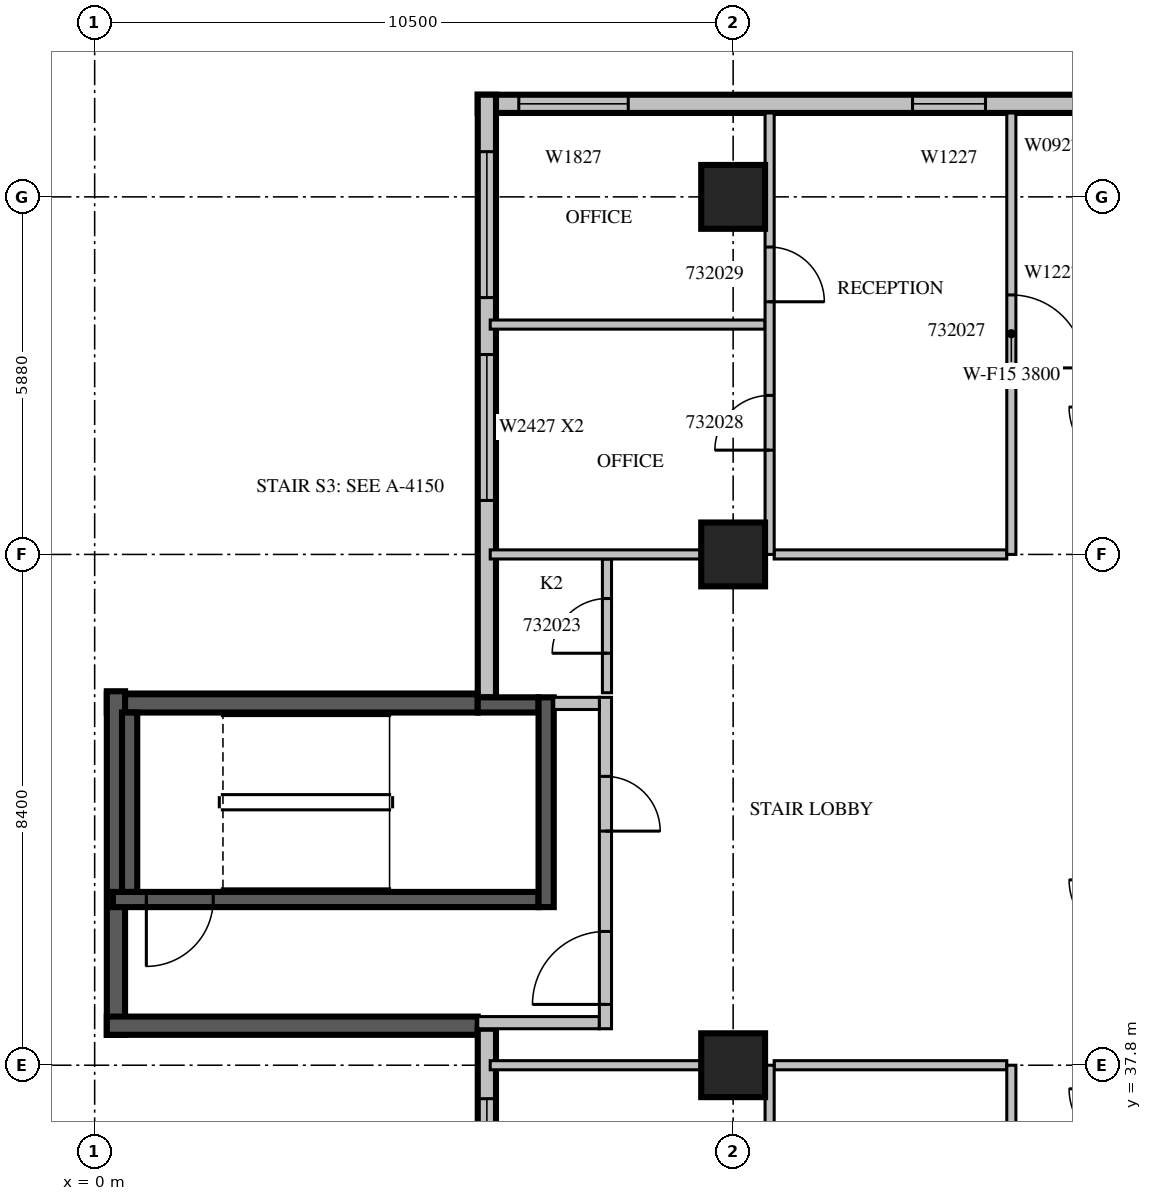
"""IFC4 building model, lengths in metres.
Left out: names, types, materials, properties, quantities, classifications, styles, units other than length and angle.
Written with IfcOpenShell. Run it as: python <this file> out.ifc"""

import sys

from ifc_helpers import new_model, si_unit, direction, frame, frame_2d, origin, origin_2d, place, context, subcontext, project, spatial, rectangle, extrude, source, transform, mapped, element, fill, save


model = new_model("IFC4")
c1 = context("Model", 3, precision=1e-05, world=origin(), true_north=direction((0.0, 1.0)))
c2 = subcontext(c1, "Body", "Model", "MODEL_VIEW")
j1 = project(units=[si_unit("LENGTHUNIT", "METRE"), si_unit("PLANEANGLEUNIT", "RADIAN")], contexts=[c1])
p1 = place(None, origin())
s1 = spatial("IfcSite", under=j1, at=p1, CompositionType="ELEMENT")
p2 = place(p1, origin())
s2 = spatial("IfcBuilding", under=s1, at=p2, CompositionType="ELEMENT")
p3 = place(p2, frame((0.0, 0.0, 145.5)))
s3 = spatial("IfcBuildingStorey", under=s2, at=p3, CompositionType="ELEMENT", Elevation=145.5)
m1 = source(origin(), c2, "Body", "SweptSolid", [
    extrude(rectangle(XDim=1.05, YDim=1.05, at=origin_2d()), origin(), (0.0, 0.0, 1.0), 4.2),
])
for number, where, z_axis, x_axis in (
    (1, (10.5, 37.8, 0.0), (0.0, 0.0, 1.0), (1.0, 0.0, 0.0)),
    (2, (10.5, 46.2, 0.0), (0.0, 0.0, 1.0), (1.0, 0.0, 0.0)),
    (3, (10.5, 52.08, 0.0), (0.0, 0.0, 1.0), (1.0, 0.0, 0.0)),
):
    element("IfcColumn", number, at=place(p3, frame(where, z_axis=z_axis, x_axis=x_axis)), inside=s3, PredefinedType="COLUMN", context=c2, shape_type="MappedRepresentation", body=[
        mapped(m1, transform((0.0, 0.0, 0.0), scale=1.0)),
    ])
m2 = source(origin(), c2, "Body", "SweptSolid", [
    extrude(rectangle(XDim=10.5, YDim=0.3, at=frame_2d((5.25, 0.0))), origin(), (0.0, 0.0, 1.0), 3.8),
])
p4 = place(p3, frame((16.8, 53.61, 0.0), z_axis=(0.0, 0.0, 1.0), x_axis=(-1.0, 0.0, 0.0)))
e4 = element("IfcWall", 4, at=p4, inside=s3, PredefinedType="STANDARD", context=c2, shape_type="MappedRepresentation", body=[
    mapped(m2, transform((0.0, 0.0, 0.0), scale=1.0)),
])
m3 = source(origin(), c2, "Body", "SweptSolid", [
    extrude(rectangle(XDim=1.2, YDim=2.7, at=frame_2d((0.6, 1.35))), frame((0.0, 0.16, 0.0), z_axis=(0.0, -1.0, 0.0), x_axis=(1.0, 0.0, 0.0)), (0.0, 0.0, 1.0), 0.32),
])
p5 = place(p4, frame((2.15, 0.0, 0.6)))
e5 = element("IfcOpeningElement", 5, at=p5, cuts=e4, PredefinedType="OPENING", context=c2, shape_type="MappedRepresentation", body=[
    mapped(m3, transform((0.0, 0.0, 0.0), scale=1.0)),
])
m4 = source(origin(), c2, "Body", "SweptSolid", [
    extrude(rectangle(XDim=1.8, YDim=2.7, at=frame_2d((0.9, 1.35))), frame((0.0, 0.16, 0.0), z_axis=(0.0, -1.0, 0.0), x_axis=(1.0, 0.0, 0.0)), (0.0, 0.0, 1.0), 0.32),
])
p6 = place(p4, frame((8.025, 0.0, 0.6)))
e6 = element("IfcOpeningElement", 6, at=p6, cuts=e4, PredefinedType="OPENING", context=c2, shape_type="MappedRepresentation", body=[
    mapped(m4, transform((0.0, 0.0, 0.0), scale=1.0)),
])
m5 = source(origin(), c2, "Body", "SweptSolid", [
    extrude(rectangle(XDim=9.91, YDim=0.3, at=frame_2d((4.955, 0.0))), origin(), (0.0, 0.0, 1.0), 3.8),
])
p7 = place(p3, frame((6.45, 53.76, 0.0), z_axis=(0.0, 0.0, 1.0), x_axis=(0.0, -1.0, 0.0)))
e7 = element("IfcWall", 7, at=p7, inside=s3, PredefinedType="STANDARD", context=c2, shape_type="MappedRepresentation", body=[
    mapped(m5, transform((0.0, 0.0, 0.0), scale=1.0)),
])
m6 = source(origin(), c2, "Body", "SweptSolid", [
    extrude(rectangle(XDim=2.4, YDim=2.7, at=frame_2d((1.2, 1.35))), frame((0.0, 0.16, 0.0), z_axis=(0.0, -1.0, 0.0), x_axis=(1.0, 0.0, 0.0)), (0.0, 0.0, 1.0), 0.32),
])
p8 = place(p7, frame((4.272, 0.0, 0.6)))
e8 = element("IfcOpeningElement", 8, at=p8, cuts=e7, PredefinedType="OPENING", context=c2, shape_type="MappedRepresentation", body=[
    mapped(m6, transform((0.0, 0.0, 0.0), scale=1.0)),
])
p9 = place(p7, frame((0.936, 0.0, 0.6)))
e9 = element("IfcOpeningElement", 9, at=p9, cuts=e7, PredefinedType="OPENING", context=c2, shape_type="MappedRepresentation", body=[
    mapped(m6, transform((0.0, 0.0, 0.0), scale=1.0)),
])
m7 = source(origin(), c2, "Body", "SweptSolid", [
    extrude(rectangle(XDim=6.1, YDim=0.3, at=frame_2d((3.05, 0.0))), origin(), (0.0, 0.0, 1.0), 3.8),
])
p10 = place(p3, frame((6.3, 43.75, 0.0), z_axis=(0.0, 0.0, 1.0), x_axis=(-1.0, 0.0, 0.0)))
e10 = element("IfcWall", 10, at=p10, inside=s3, PredefinedType="SOLIDWALL", context=c2, shape_type="MappedRepresentation", body=[
    mapped(m7, transform((0.0, 0.0, 0.0), scale=1.0)),
])
m8 = source(origin(), c2, "Body", "SweptSolid", [
    extrude(rectangle(XDim=5.65, YDim=0.3, at=frame_2d((2.825, 0.0))), origin(), (0.0, 0.0, 1.0), 3.8),
])
p11 = place(p3, frame((0.35, 43.95, 0.0), z_axis=(0.0, 0.0, 1.0), x_axis=(0.0, -1.0, 0.0)))
e11 = element("IfcWall", 11, at=p11, inside=s3, PredefinedType="SOLIDWALL", context=c2, shape_type="MappedRepresentation", body=[
    mapped(m8, transform((0.0, 0.0, 0.0), scale=1.0)),
])
p12 = place(p3, frame((0.2, 38.45, 0.0), z_axis=(0.0, 0.0, 1.0), x_axis=(1.0, 0.0, 0.0)))
e12 = element("IfcWall", 12, at=p12, inside=s3, PredefinedType="SOLIDWALL", context=c2, shape_type="MappedRepresentation", body=[
    mapped(m7, transform((0.0, 0.0, 0.0), scale=1.0)),
])
m9 = source(origin(), c2, "Body", "SweptSolid", [
    extrude(rectangle(XDim=16.4, YDim=0.3, at=frame_2d((8.2, 0.0))), origin(), (0.0, 0.0, 1.0), 3.3),
])
p13 = place(p3, frame((6.45, 38.4, 0.0), z_axis=(0.0, 0.0, 1.0), x_axis=(0.0, -1.0, 0.0)))
e13 = element("IfcWall", 13, at=p13, inside=s3, PredefinedType="STANDARD", context=c2, shape_type="MappedRepresentation", body=[
    mapped(m9, transform((0.0, 0.0, 0.0), scale=1.0)),
])
p14 = place(p13, frame((1.15, 0.0, 0.6)))
e14 = element("IfcOpeningElement", 14, at=p14, cuts=e13, PredefinedType="OPENING", context=c2, shape_type="MappedRepresentation", body=[
    mapped(m4, transform((0.0, 0.0, 0.0), scale=1.0)),
])
p15 = place(p13, frame((5.162, 0.0, 0.6)))
e15 = element("IfcOpeningElement", 15, at=p15, cuts=e13, PredefinedType="OPENING", context=c2, shape_type="MappedRepresentation", body=[
    mapped(m4, transform((0.0, 0.0, 0.0), scale=1.0)),
])
p16 = place(p13, frame((9.438, 0.0, 0.6)))
e16 = element("IfcOpeningElement", 16, at=p16, cuts=e13, PredefinedType="OPENING", context=c2, shape_type="MappedRepresentation", body=[
    mapped(m4, transform((0.0, 0.0, 0.0), scale=1.0)),
])
p17 = place(p13, frame((12.912, 0.0, 0.6)))
e17 = element("IfcOpeningElement", 17, at=p17, cuts=e13, PredefinedType="OPENING", context=c2, shape_type="MappedRepresentation", body=[
    mapped(m3, transform((0.0, 0.0, 0.0), scale=1.0)),
])
m10 = source(origin(), c2, "Body", "SweptSolid", [
    extrude(rectangle(XDim=7.0, YDim=0.25, at=frame_2d((3.5, 0.0))), origin(), (0.0, 0.0, 1.0), 3.8),
])
p18 = place(p3, frame((0.3, 40.525, 0.0), z_axis=(0.0, 0.0, 1.0), x_axis=(1.0, 0.0, 0.0)))
e18 = element("IfcWall", 18, at=p18, inside=s3, PredefinedType="SOLIDWALL", context=c2, shape_type="MappedRepresentation", body=[
    mapped(m10, transform((0.0, 0.0, 0.0), scale=1.0)),
])
m11 = source(origin(), c2, "Body", "SweptSolid", [
    extrude(rectangle(XDim=1.1, YDim=2.1, at=frame_2d((0.55, 1.05))), frame((0.0, 0.135, 0.0), z_axis=(0.0, -1.0, 0.0), x_axis=(1.0, 0.0, 0.0)), (0.0, 0.0, 1.0), 0.27),
])
p19 = place(p18, frame((0.55, 0.0, 0.0)))
e19 = element("IfcOpeningElement", 19, at=p19, cuts=e18, PredefinedType="OPENING", context=c2, shape_type="MappedRepresentation", body=[
    mapped(m11, transform((0.0, 0.0, 0.0), scale=1.0)),
])
m12 = source(origin(), c2, "Body", "SweptSolid", [
    extrude(rectangle(XDim=1.0, YDim=0.25, at=frame_2d((0.5, 0.0))), origin(), (0.0, 0.0, 1.0), 3.8),
])
p20 = place(p3, frame((6.3, 43.725, 0.0), z_axis=(0.0, 0.0, 1.0), x_axis=(1.0, 0.0, 0.0)))
e20 = element("IfcWall", 20, at=p20, inside=s3, PredefinedType="SOLIDWALL", context=c2, shape_type="MappedRepresentation", body=[
    mapped(m12, transform((0.0, 0.0, 0.0), scale=1.0)),
])
m13 = source(origin(), c2, "Body", "SweptSolid", [
    extrude(rectangle(XDim=3.45, YDim=0.25, at=frame_2d((1.725, 0.0))), origin(), (0.0, 0.0, 1.0), 3.8),
])
p21 = place(p3, frame((7.425, 40.4, 0.0), z_axis=(0.0, 0.0, 1.0), x_axis=(0.0, 1.0, 0.0)))
e21 = element("IfcWall", 21, at=p21, inside=s3, PredefinedType="SOLIDWALL", context=c2, shape_type="MappedRepresentation", body=[
    mapped(m13, transform((0.0, 0.0, 0.0), scale=1.0)),
])
m14 = source(origin(), c2, "Body", "SweptSolid", [
    extrude(rectangle(XDim=2.95, YDim=0.25, at=frame_2d((1.475, 0.0))), origin(), (0.0, 0.0, 1.0), 3.8),
])
p22 = place(p3, frame((0.575, 40.65, 0.0), z_axis=(0.0, 0.0, 1.0), x_axis=(0.0, 1.0, 0.0)))
e22 = element("IfcWall", 22, at=p22, inside=s3, PredefinedType="SOLIDWALL", context=c2, shape_type="MappedRepresentation", body=[
    mapped(m14, transform((0.0, 0.0, 0.0), scale=1.0)),
])
m15 = source(origin(), c2, "Body", "SweptSolid", [
    extrude(rectangle(XDim=2.0, YDim=0.2, at=frame_2d((1.0, 0.0))), origin(), (0.0, 0.0, 1.0), 3.8),
])
p23 = place(p3, frame((6.3, 38.5, 0.0), z_axis=(0.0, 0.0, 1.0), x_axis=(1.0, 0.0, 0.0)))
e23 = element("IfcWall", 23, at=p23, inside=s3, PredefinedType="PARTITIONING", context=c2, shape_type="MappedRepresentation", body=[
    mapped(m15, transform((0.0, 0.0, 0.0), scale=1.0)),
])
m16 = source(origin(), c2, "Body", "SweptSolid", [
    extrude(rectangle(XDim=5.45, YDim=0.2, at=frame_2d((2.725, 0.0))), origin(), (0.0, 0.0, 1.0), 3.8),
])
p24 = place(p3, frame((8.4, 38.4, 0.0), z_axis=(0.0, 0.0, 1.0), x_axis=(0.0, 1.0, 0.0)))
e24 = element("IfcWall", 24, at=p24, inside=s3, PredefinedType="PARTITIONING", context=c2, shape_type="MappedRepresentation", body=[
    mapped(m16, transform((0.0, 0.0, 0.0), scale=1.0)),
])
m17 = source(origin(), c2, "Body", "SweptSolid", [
    extrude(rectangle(XDim=1.2, YDim=2.1, at=frame_2d((0.6, 1.05))), frame((0.0, 0.11, 0.0), z_axis=(0.0, -1.0, 0.0), x_axis=(1.0, 0.0, 0.0)), (0.0, 0.0, 1.0), 0.22),
])
p25 = place(p24, frame((0.4, 0.0, 0.0)))
e25 = element("IfcOpeningElement", 25, at=p25, cuts=e24, PredefinedType="OPENING", context=c2, shape_type="MappedRepresentation", body=[
    mapped(m17, transform((0.0, 0.0, 0.0), scale=1.0)),
])
m18 = source(origin(), c2, "Body", "SweptSolid", [
    extrude(rectangle(XDim=0.9, YDim=2.1, at=frame_2d((0.45, 1.05))), frame((0.0, 0.11, 0.0), z_axis=(0.0, -1.0, 0.0), x_axis=(1.0, 0.0, 0.0)), (0.0, 0.0, 1.0), 0.22),
])
p26 = place(p24, frame((3.25, 0.0, 0.0)))
e26 = element("IfcOpeningElement", 26, at=p26, cuts=e24, PredefinedType="OPENING", context=c2, shape_type="MappedRepresentation", body=[
    mapped(m18, transform((0.0, 0.0, 0.0), scale=1.0)),
])
m19 = source(origin(), c2, "Body", "SweptSolid", [
    extrude(rectangle(XDim=0.75, YDim=0.2, at=frame_2d((0.375, 0.0))), origin(), (0.0, 0.0, 1.0), 3.8),
])
p27 = place(p3, frame((7.55, 43.75, 0.0), z_axis=(0.0, 0.0, 1.0), x_axis=(1.0, 0.0, 0.0)))
e27 = element("IfcWall", 27, at=p27, inside=s3, PredefinedType="PARTITIONING", context=c2, shape_type="MappedRepresentation", body=[
    mapped(m19, transform((0.0, 0.0, 0.0), scale=1.0)),
])
m20 = source(origin(), c2, "Body", "SweptSolid", [
    extrude(rectangle(XDim=2.2, YDim=0.15, at=frame_2d((1.1, 0.0))), origin(), (0.0, 0.0, 1.0), 3.8),
])
p28 = place(p3, frame((8.425, 43.925, 0.0), z_axis=(0.0, 0.0, 1.0), x_axis=(0.0, 1.0, 0.0)))
e28 = element("IfcWall", 28, at=p28, inside=s3, PredefinedType="PARTITIONING", context=c2, shape_type="MappedRepresentation", body=[
    mapped(m20, transform((0.0, 0.0, 0.0), scale=1.0)),
])
m21 = source(origin(), c2, "Body", "SweptSolid", [
    extrude(rectangle(XDim=0.9, YDim=2.1, at=frame_2d((0.45, 1.05))), frame((0.0, 0.085, 0.0), z_axis=(0.0, -1.0, 0.0), x_axis=(1.0, 0.0, 0.0)), (0.0, 0.0, 1.0), 0.17),
])
p29 = place(p28, frame((0.65, 0.0, 0.0)))
e29 = element("IfcOpeningElement", 29, at=p29, cuts=e28, PredefinedType="OPENING", context=c2, shape_type="MappedRepresentation", body=[
    mapped(m21, transform((0.0, 0.0, 0.0), scale=1.0)),
])
m22 = source(origin(), c2, "Body", "SweptSolid", [
    extrude(rectangle(XDim=3.471, YDim=0.15, at=frame_2d((1.736, 0.0))), origin(), (0.0, 0.0, 1.0), 3.8),
])
p30 = place(p3, frame((9.976, 37.8, 0.0), z_axis=(0.0, 0.0, 1.0), x_axis=(-1.0, 0.0, 0.0)))
e30 = element("IfcWall", 30, at=p30, inside=s3, PredefinedType="PARTITIONING", context=c2, shape_type="MappedRepresentation", body=[
    mapped(m22, transform((0.0, 0.0, 0.0), scale=1.0)),
])
m23 = source(origin(), c2, "Body", "SweptSolid", [
    extrude(rectangle(XDim=3.825, YDim=0.15, at=frame_2d((1.913, 0.0))), origin(), (0.0, 0.0, 1.0), 3.8),
])
p31 = place(p3, frame((15.0, 37.8, 0.0), z_axis=(0.0, 0.0, 1.0), x_axis=(-1.0, 0.0, 0.0)))
e31 = element("IfcWall", 31, at=p31, inside=s3, PredefinedType="PARTITIONING", context=c2, shape_type="MappedRepresentation", body=[
    mapped(m23, transform((0.0, 0.0, 0.0), scale=1.0)),
])
m24 = source(origin(), c2, "Body", "SweptSolid", [
    extrude(rectangle(XDim=8.4, YDim=0.15, at=frame_2d((4.2, 0.0))), origin(), (0.0, 0.0, 1.0), 3.3),
])
p32 = place(p3, frame((11.1, 29.4, 0.0), z_axis=(0.0, 0.0, 1.0), x_axis=(0.0, 1.0, 0.0)))
e32 = element("IfcWall", 32, at=p32, inside=s3, PredefinedType="PARTITIONING", context=c2, shape_type="MappedRepresentation", body=[
    mapped(m24, transform((0.0, 0.0, 0.0), scale=1.0)),
])
p33 = place(p32, frame((1.925, 0.0, 0.0)))
e33 = element("IfcOpeningElement", 33, at=p33, cuts=e32, PredefinedType="OPENING", context=c2, shape_type="MappedRepresentation", body=[
    mapped(m21, transform((0.0, 0.0, 0.0), scale=1.0)),
])
p34 = place(p32, frame((5.625, 0.0, 0.0)))
e34 = element("IfcOpeningElement", 34, at=p34, cuts=e32, PredefinedType="OPENING", context=c2, shape_type="MappedRepresentation", body=[
    mapped(m21, transform((0.0, 0.0, 0.0), scale=1.0)),
])
m25 = source(origin(), c2, "Body", "SweptSolid", [
    extrude(rectangle(XDim=4.52, YDim=0.15, at=frame_2d((2.26, 0.0))), origin(), (0.0, 0.0, 1.0), 3.8),
])
p35 = place(p3, frame((11.025, 49.98, 0.0), z_axis=(0.0, 0.0, 1.0), x_axis=(-1.0, 0.0, 0.0)))
e35 = element("IfcWall", 35, at=p35, inside=s3, PredefinedType="PARTITIONING", context=c2, shape_type="MappedRepresentation", body=[
    mapped(m25, transform((0.0, 0.0, 0.0), scale=1.0)),
])
p36 = place(p3, frame((9.976, 46.2, 0.0), z_axis=(0.0, 0.0, 1.0), x_axis=(-1.0, 0.0, 0.0)))
e36 = element("IfcWall", 36, at=p36, inside=s3, PredefinedType="PARTITIONING", context=c2, shape_type="MappedRepresentation", body=[
    mapped(m22, transform((0.0, 0.0, 0.0), scale=1.0)),
])
p37 = place(p3, frame((15.0, 46.2, 0.0), z_axis=(0.0, 0.0, 1.0), x_axis=(-1.0, 0.0, 0.0)))
e37 = element("IfcWall", 37, at=p37, inside=s3, PredefinedType="PARTITIONING", context=c2, shape_type="MappedRepresentation", body=[
    mapped(m23, transform((0.0, 0.0, 0.0), scale=1.0)),
])
m26 = source(origin(), c2, "Body", "SweptSolid", [
    extrude(rectangle(XDim=7.26, YDim=0.15, at=frame_2d((3.63, 0.0))), origin(), (0.0, 0.0, 1.0), 3.8),
])
p38 = place(p3, frame((11.1, 46.2, 0.0), z_axis=(0.0, 0.0, 1.0), x_axis=(0.0, 1.0, 0.0)))
e38 = element("IfcWall", 38, at=p38, inside=s3, PredefinedType="PARTITIONING", context=c2, shape_type="MappedRepresentation", body=[
    mapped(m26, transform((0.0, 0.0, 0.0), scale=1.0)),
])
p39 = place(p38, frame((1.715, 0.0, 0.0)))
e39 = element("IfcOpeningElement", 39, at=p39, cuts=e38, PredefinedType="OPENING", context=c2, shape_type="MappedRepresentation", body=[
    mapped(m21, transform((0.0, 0.0, 0.0), scale=1.0)),
])
p40 = place(p38, frame((4.155, 0.0, 0.0)))
e40 = element("IfcOpeningElement", 40, at=p40, cuts=e38, PredefinedType="OPENING", context=c2, shape_type="MappedRepresentation", body=[
    mapped(m21, transform((0.0, 0.0, 0.0), scale=1.0)),
])
p41 = place(p3, frame((15.075, 29.4, 0.0), z_axis=(0.0, 0.0, 1.0), x_axis=(0.0, 1.0, 0.0)))
e41 = element("IfcWall", 41, at=p41, inside=s3, PredefinedType="PARTITIONING", context=c2, shape_type="MappedRepresentation", body=[
    mapped(m24, transform((0.0, 0.0, 0.0), scale=1.0)),
])
m27 = source(origin(), c2, "Body", "SweptSolid", [
    extrude(rectangle(XDim=1.2, YDim=2.1, at=frame_2d((0.6, 1.05))), frame((0.0, 0.085, 0.0), z_axis=(0.0, -1.0, 0.0), x_axis=(1.0, 0.0, 0.0)), (0.0, 0.0, 1.0), 0.17),
])
p42 = place(p41, frame((3.6, 0.0, 0.0)))
e42 = element("IfcOpeningElement", 42, at=p42, cuts=e41, PredefinedType="OPENING", context=c2, shape_type="MappedRepresentation", body=[
    mapped(m27, transform((0.0, 0.0, 0.0), scale=1.0)),
])
p43 = place(p3, frame((15.075, 46.2, 0.0), z_axis=(0.0, 0.0, 1.0), x_axis=(0.0, 1.0, 0.0)))
e43 = element("IfcWall", 43, at=p43, inside=s3, PredefinedType="PARTITIONING", context=c2, shape_type="MappedRepresentation", body=[
    mapped(m26, transform((0.0, 0.0, 0.0), scale=1.0)),
])
p44 = place(p43, frame((3.067, 0.0, 0.0)))
e44 = element("IfcOpeningElement", 44, at=p44, cuts=e43, PredefinedType="OPENING", context=c2, shape_type="MappedRepresentation", body=[
    mapped(m27, transform((0.0, 0.0, 0.0), scale=1.0)),
])
m28 = source(origin(), c2, "Body", "SweptSolid", [
    extrude(rectangle(XDim=1.2, YDim=2.7, at=frame_2d((0.6, 1.35))), frame((0.0, 0.03, 0.0), z_axis=(0.0, -1.0, 0.0), x_axis=(1.0, 0.0, 0.0)), (0.0, 0.0, 1.0), 0.06),
])
p45 = place(p5, origin())
e45 = element("IfcWindow", 45, at=p45, inside=s3, PartitioningType="SINGLE_PANEL", PredefinedType="WINDOW", context=c2, shape_type="MappedRepresentation", body=[
    mapped(m28, transform((0.0, 0.0, 0.0), scale=1.0)),
])
fill(e5, e45)
m29 = source(origin(), c2, "Body", "SweptSolid", [
    extrude(rectangle(XDim=1.8, YDim=2.7, at=frame_2d((0.9, 1.35))), frame((0.0, 0.03, 0.0), z_axis=(0.0, -1.0, 0.0), x_axis=(1.0, 0.0, 0.0)), (0.0, 0.0, 1.0), 0.06),
])
p46 = place(p6, origin())
e46 = element("IfcWindow", 46, at=p46, inside=s3, PartitioningType="SINGLE_PANEL", PredefinedType="WINDOW", context=c2, shape_type="MappedRepresentation", body=[
    mapped(m29, transform((0.0, 0.0, 0.0), scale=1.0)),
])
fill(e6, e46)
m30 = source(origin(), c2, "Body", "SweptSolid", [
    extrude(rectangle(XDim=2.4, YDim=2.7, at=frame_2d((1.2, 1.35))), frame((0.0, 0.03, 0.0), z_axis=(0.0, -1.0, 0.0), x_axis=(1.0, 0.0, 0.0)), (0.0, 0.0, 1.0), 0.06),
])
p47 = place(p8, origin())
e47 = element("IfcWindow", 47, at=p47, inside=s3, PartitioningType="SINGLE_PANEL", PredefinedType="WINDOW", context=c2, shape_type="MappedRepresentation", body=[
    mapped(m30, transform((0.0, 0.0, 0.0), scale=1.0)),
])
fill(e8, e47)
p48 = place(p9, origin())
e48 = element("IfcWindow", 48, at=p48, inside=s3, PartitioningType="SINGLE_PANEL", PredefinedType="WINDOW", context=c2, shape_type="MappedRepresentation", body=[
    mapped(m30, transform((0.0, 0.0, 0.0), scale=1.0)),
])
fill(e9, e48)
p49 = place(p14, origin())
e49 = element("IfcWindow", 49, at=p49, inside=s3, PartitioningType="SINGLE_PANEL", PredefinedType="WINDOW", context=c2, shape_type="MappedRepresentation", body=[
    mapped(m29, transform((0.0, 0.0, 0.0), scale=1.0)),
])
fill(e14, e49)
m31 = source(origin(), c2, "Body", "SweptSolid", [
    extrude(rectangle(XDim=1.1, YDim=2.1, at=frame_2d((0.55, 1.05))), frame((0.0, 0.025, 0.0), z_axis=(0.0, -1.0, 0.0), x_axis=(1.0, 0.0, 0.0)), (0.0, 0.0, 1.0), 0.05),
])
p50 = place(p19, origin())
e50 = element("IfcDoor", 50, at=p50, inside=s3, OperationType="SINGLE_SWING_RIGHT", PredefinedType="DOOR", context=c2, shape_type="MappedRepresentation", body=[
    mapped(m31, transform((0.0, 0.0, 0.0), scale=1.0)),
])
fill(e19, e50)
m32 = source(origin(), c2, "Body", "SweptSolid", [
    extrude(rectangle(XDim=1.2, YDim=2.1, at=frame_2d((0.6, 1.05))), frame((0.0, 0.025, 0.0), z_axis=(0.0, -1.0, 0.0), x_axis=(1.0, 0.0, 0.0)), (0.0, 0.0, 1.0), 0.05),
])
p51 = place(p25, origin())
e51 = element("IfcDoor", 51, at=p51, inside=s3, OperationType="SINGLE_SWING_LEFT", PredefinedType="DOOR", context=c2, shape_type="MappedRepresentation", body=[
    mapped(m32, transform((0.0, 0.0, 0.0), scale=1.0)),
])
fill(e25, e51)
m33 = source(origin(), c2, "Body", "SweptSolid", [
    extrude(rectangle(XDim=0.9, YDim=2.1, at=frame_2d((0.45, 1.05))), frame((0.0, 0.025, 0.0), z_axis=(0.0, -1.0, 0.0), x_axis=(1.0, 0.0, 0.0)), (0.0, 0.0, 1.0), 0.05),
])
p52 = place(p26, origin())
e52 = element("IfcDoor", 52, at=p52, inside=s3, OperationType="SINGLE_SWING_RIGHT", PredefinedType="DOOR", context=c2, shape_type="MappedRepresentation", body=[
    mapped(m33, transform((0.0, 0.0, 0.0), scale=1.0)),
])
fill(e26, e52)
p53 = place(p29, origin())
e53 = element("IfcDoor", 53, at=p53, inside=s3, OperationType="SINGLE_SWING_LEFT", PredefinedType="DOOR", context=c2, shape_type="MappedRepresentation", body=[
    mapped(m33, transform((0.0, 0.0, 0.0), scale=1.0)),
])
fill(e29, e53)
p54 = place(p44, origin())
e54 = element("IfcDoor", 54, at=p54, inside=s3, OperationType="SINGLE_SWING_RIGHT", PredefinedType="DOOR", context=c2, shape_type="MappedRepresentation", body=[
    mapped(m32, transform((0.0, 0.0, 0.0), scale=1.0)),
])
fill(e44, e54)
p55 = place(p39, origin())
e55 = element("IfcDoor", 55, at=p55, inside=s3, OperationType="SINGLE_SWING_LEFT", PredefinedType="DOOR", context=c2, shape_type="MappedRepresentation", body=[
    mapped(m33, transform((0.0, 0.0, 0.0), scale=1.0)),
])
fill(e39, e55)
p56 = place(p40, origin())
e56 = element("IfcDoor", 56, at=p56, inside=s3, OperationType="SINGLE_SWING_RIGHT", PredefinedType="DOOR", context=c2, shape_type="MappedRepresentation", body=[
    mapped(m33, transform((0.0, 0.0, 0.0), scale=1.0)),
])
fill(e40, e56)
save(model, sys.argv[1])
